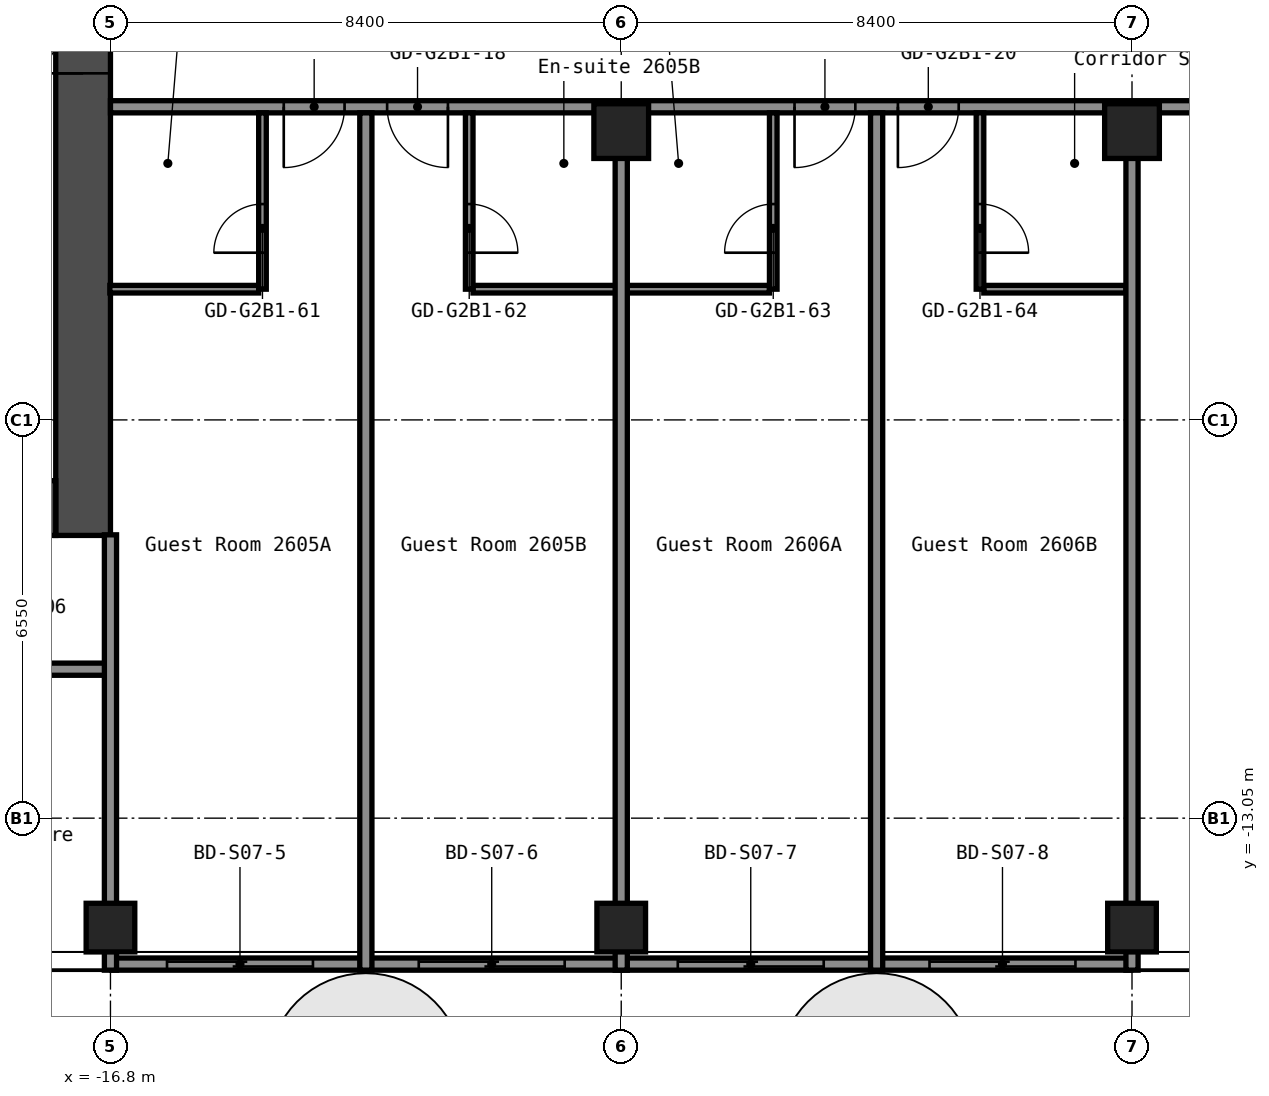
"""IFC4 building model, lengths in metres.
Left out: names, types, materials, properties, quantities, classifications, styles, units other than length and angle.
Written with IfcOpenShell. Run it as: python <this file> out.ifc"""

import sys

from ifc_helpers import new_model, si_unit, direction, frame, frame_2d, origin, origin_2d, place, context, subcontext, project, spatial, rectangle, hollow_rectangle, extrude, element, fill, save


model = new_model("IFC4")
c1 = context("Model", 3, precision=1e-05, world=origin(), true_north=direction((0.0, 1.0)))
c2 = subcontext(c1, "Body", "Model", "MODEL_VIEW")
j1 = project(units=[si_unit("LENGTHUNIT", "METRE"), si_unit("PLANEANGLEUNIT", "RADIAN")], contexts=[c1])
p1 = place(None, origin())
s1 = spatial("IfcSite", under=j1, at=p1, CompositionType="ELEMENT")
p2 = place(p1, origin())
s2 = spatial("IfcBuilding", under=s1, at=p2, CompositionType="ELEMENT")
p3 = place(p2, frame((0.0, 0.0, 94.6)))
s3 = spatial("IfcBuildingStorey", under=s2, at=p3, CompositionType="ELEMENT", Elevation=94.6)
for number, where, z_axis, x_axis in (
    (1, (-16.8, -14.85, 0.0), (0.0, 0.0, 1.0), (1.0, 0.0, 0.0)),
    (2, (-8.4, -14.85, 0.0), (0.0, 0.0, 1.0), (1.0, 0.0, 0.0)),
):
    element("IfcColumn", number, at=place(p3, frame(where, z_axis=z_axis, x_axis=x_axis)), inside=s3, PredefinedType="COLUMN", context=c2, shape_type="SweptSolid", body=[
        extrude(hollow_rectangle(XDim=0.8, YDim=0.8, WallThickness=0.032, at=origin_2d()), origin(), (0.0, 0.0, 1.0), 2.8),
    ])
p4 = place(p3, frame((-8.4, -1.75, 0.0), z_axis=(0.0, 0.0, 1.0), x_axis=(1.0, 0.0, 0.0)))
e3 = element("IfcColumn", 3, at=p4, inside=s3, PredefinedType="COLUMN", context=c2, shape_type="SweptSolid", body=[
    extrude(hollow_rectangle(XDim=0.9, YDim=0.9, WallThickness=0.036, at=origin_2d()), origin(), (0.0, 0.0, 1.0), 2.8),
])
p5 = place(p3, frame((0.0, -14.85, 0.0), z_axis=(0.0, 0.0, 1.0), x_axis=(1.0, 0.0, 0.0)))
e4 = element("IfcColumn", 4, at=p5, inside=s3, PredefinedType="COLUMN", context=c2, shape_type="SweptSolid", body=[
    extrude(hollow_rectangle(XDim=0.8, YDim=0.8, WallThickness=0.032, at=origin_2d()), origin(), (0.0, 0.0, 1.0), 2.8),
])
p6 = place(p3, frame((0.0, -1.75, 0.0), z_axis=(0.0, 0.0, 1.0), x_axis=(1.0, 0.0, 0.0)))
e5 = element("IfcColumn", 5, at=p6, inside=s3, PredefinedType="COLUMN", context=c2, shape_type="SweptSolid", body=[
    extrude(hollow_rectangle(XDim=0.9, YDim=0.9, WallThickness=0.036, at=origin_2d()), origin(), (0.0, 0.0, 1.0), 2.8),
])
p7 = place(p3, frame((-17.25, -8.4, 0.0), z_axis=(0.0, 0.0, 1.0), x_axis=(0.0, 1.0, 0.0)))
e6 = element("IfcWall", 6, at=p7, inside=s3, PredefinedType="SHEAR", context=c2, shape_type="SweptSolid", body=[
    extrude(rectangle(XDim=16.8, YDim=0.9, at=frame_2d((8.4, 0.0))), origin(), (0.0, 0.0, 1.0), 2.8),
])
p8 = place(p7, frame((7.6, 0.0, 0.0)))
e7 = element("IfcOpeningElement", 7, at=p8, cuts=e6, PredefinedType="OPENING", context=c2, shape_type="SweptSolid", body=[
    extrude(rectangle(XDim=1.2, YDim=2.1, at=frame_2d((0.6, 1.05))), frame((0.0, 0.46, 0.0), z_axis=(0.0, -1.0, 0.0), x_axis=(1.0, 0.0, 0.0)), (0.0, 0.0, 1.0), 0.92),
])
p9 = place(p3, frame((-32.7, -7.95, 0.0), z_axis=(0.0, 0.0, 1.0), x_axis=(1.0, 0.0, 0.0)))
e8 = element("IfcWall", 8, at=p9, inside=s3, PredefinedType="SHEAR", context=c2, shape_type="SweptSolid", body=[
    extrude(rectangle(XDim=15.0, YDim=0.9, at=frame_2d((7.5, 0.0))), origin(), (0.0, 0.0, 1.0), 2.8),
])
p10 = place(p9, frame((11.45, 0.0, 0.0)))
e9 = element("IfcOpeningElement", 9, at=p10, cuts=e8, PredefinedType="OPENING", context=c2, shape_type="SweptSolid", body=[
    extrude(rectangle(XDim=1.0, YDim=2.1, at=frame_2d((0.5, 1.05))), frame((0.0, 0.46, 0.0), z_axis=(0.0, -1.0, 0.0), x_axis=(1.0, 0.0, 0.0)), (0.0, 0.0, 1.0), 0.92),
])
p11 = place(p3, frame((-46.5, -10.6, 0.0), z_axis=(0.0, 0.0, 1.0), x_axis=(1.0, 0.0, 0.0)))
e10 = element("IfcWall", 10, at=p11, inside=s3, PredefinedType="PARTITIONING", context=c2, shape_type="SweptSolid", body=[
    extrude(rectangle(XDim=29.7, YDim=0.2, at=frame_2d((14.85, 0.0))), origin(), (0.0, 0.0, 1.0), 2.8),
])
p12 = place(p11, frame((1.95, 0.0, 0.0)))
e11 = element("IfcOpeningElement", 11, at=p12, cuts=e10, PredefinedType="OPENING", context=c2, shape_type="SweptSolid", body=[
    extrude(rectangle(XDim=0.9, YDim=2.1, at=frame_2d((0.45, 1.05))), frame((0.0, 0.11, 0.0), z_axis=(0.0, -1.0, 0.0), x_axis=(1.0, 0.0, 0.0)), (0.0, 0.0, 1.0), 0.22),
])
p13 = place(p11, frame((6.32, 0.0, 0.0)))
e12 = element("IfcOpeningElement", 12, at=p13, cuts=e10, PredefinedType="OPENING", context=c2, shape_type="SweptSolid", body=[
    extrude(rectangle(XDim=0.9, YDim=2.1, at=frame_2d((0.45, 1.05))), frame((0.0, 0.11, 0.0), z_axis=(0.0, -1.0, 0.0), x_axis=(1.0, 0.0, 0.0)), (0.0, 0.0, 1.0), 0.22),
])
p14 = place(p11, frame((10.52, 0.0, 0.0)))
e13 = element("IfcOpeningElement", 13, at=p14, cuts=e10, PredefinedType="OPENING", context=c2, shape_type="SweptSolid", body=[
    extrude(rectangle(XDim=0.9, YDim=2.1, at=frame_2d((0.45, 1.05))), frame((0.0, 0.11, 0.0), z_axis=(0.0, -1.0, 0.0), x_axis=(1.0, 0.0, 0.0)), (0.0, 0.0, 1.0), 0.22),
])
p15 = place(p11, frame((16.6, 0.0, 0.0)))
e14 = element("IfcOpeningElement", 14, at=p15, cuts=e10, PredefinedType="OPENING", context=c2, shape_type="SweptSolid", body=[
    extrude(rectangle(XDim=1.0, YDim=2.1, at=frame_2d((0.5, 1.05))), frame((0.0, 0.11, 0.0), z_axis=(0.0, -1.0, 0.0), x_axis=(1.0, 0.0, 0.0)), (0.0, 0.0, 1.0), 0.22),
])
p16 = place(p11, frame((23.37, 0.0, 0.0)))
e15 = element("IfcOpeningElement", 15, at=p16, cuts=e10, PredefinedType="OPENING", context=c2, shape_type="SweptSolid", body=[
    extrude(rectangle(XDim=0.9, YDim=2.1, at=frame_2d((0.45, 1.05))), frame((0.0, 0.11, 0.0), z_axis=(0.0, -1.0, 0.0), x_axis=(1.0, 0.0, 0.0)), (0.0, 0.0, 1.0), 0.22),
])
p17 = place(p11, frame((27.57, 0.0, 0.0)))
e16 = element("IfcOpeningElement", 16, at=p17, cuts=e10, PredefinedType="OPENING", context=c2, shape_type="SweptSolid", body=[
    extrude(rectangle(XDim=0.9, YDim=2.1, at=frame_2d((0.45, 1.05))), frame((0.0, 0.11, 0.0), z_axis=(0.0, -1.0, 0.0), x_axis=(1.0, 0.0, 0.0)), (0.0, 0.0, 1.0), 0.22),
])
p18 = place(p3, frame((-16.81, -4.35, 0.0), z_axis=(0.0, 0.0, 1.0), x_axis=(1.0, 0.0, 0.0)))
e17 = element("IfcWall", 17, at=p18, inside=s3, PredefinedType="PARTITIONING", context=c2, shape_type="SweptSolid", body=[
    extrude(rectangle(XDim=2.448, YDim=0.125, at=frame_2d((1.224, 0.0))), origin(), (0.0, 0.0, 1.0), 2.8),
])
p19 = place(p3, frame((-10.837, -4.35, 0.0), z_axis=(0.0, 0.0, 1.0), x_axis=(1.0, 0.0, 0.0)))
e18 = element("IfcWall", 18, at=p19, inside=s3, PredefinedType="PARTITIONING", context=c2, shape_type="SweptSolid", body=[
    extrude(rectangle(XDim=4.875, YDim=0.125, at=frame_2d((2.438, 0.0))), origin(), (0.0, 0.0, 1.0), 2.8),
])
p20 = place(p3, frame((-2.438, -4.35, 0.0), z_axis=(0.0, 0.0, 1.0), x_axis=(1.0, 0.0, 0.0)))
e19 = element("IfcWall", 19, at=p20, inside=s3, PredefinedType="PARTITIONING", context=c2, shape_type="SweptSolid", body=[
    extrude(rectangle(XDim=2.337, YDim=0.125, at=frame_2d((1.169, 0.0))), origin(), (0.0, 0.0, 1.0), 2.8),
])
p21 = place(p3, frame((-16.8, -1.35, 0.0), z_axis=(0.0, 0.0, 1.0), x_axis=(1.0, 0.0, 0.0)))
e20 = element("IfcWall", 20, at=p21, inside=s3, PredefinedType="PARTITIONING", context=c2, shape_type="SweptSolid", body=[
    extrude(rectangle(XDim=33.6, YDim=0.2, at=frame_2d((16.8, 0.0))), origin(), (0.0, 0.0, 1.0), 2.8),
])
p22 = place(p21, frame((2.85, 0.0, 0.0)))
e21 = element("IfcOpeningElement", 21, at=p22, cuts=e20, PredefinedType="OPENING", context=c2, shape_type="SweptSolid", body=[
    extrude(rectangle(XDim=1.0, YDim=2.1, at=frame_2d((0.5, 1.05))), frame((0.0, 0.11, 0.0), z_axis=(0.0, -1.0, 0.0), x_axis=(1.0, 0.0, 0.0)), (0.0, 0.0, 1.0), 0.22),
])
p23 = place(p21, frame((4.55, 0.0, 0.0)))
e22 = element("IfcOpeningElement", 22, at=p23, cuts=e20, PredefinedType="OPENING", context=c2, shape_type="SweptSolid", body=[
    extrude(rectangle(XDim=1.0, YDim=2.1, at=frame_2d((0.5, 1.05))), frame((0.0, 0.11, 0.0), z_axis=(0.0, -1.0, 0.0), x_axis=(1.0, 0.0, 0.0)), (0.0, 0.0, 1.0), 0.22),
])
p24 = place(p21, frame((11.25, 0.0, 0.0)))
e23 = element("IfcOpeningElement", 23, at=p24, cuts=e20, PredefinedType="OPENING", context=c2, shape_type="SweptSolid", body=[
    extrude(rectangle(XDim=1.0, YDim=2.1, at=frame_2d((0.5, 1.05))), frame((0.0, 0.11, 0.0), z_axis=(0.0, -1.0, 0.0), x_axis=(1.0, 0.0, 0.0)), (0.0, 0.0, 1.0), 0.22),
])
p25 = place(p21, frame((12.95, 0.0, 0.0)))
e24 = element("IfcOpeningElement", 24, at=p25, cuts=e20, PredefinedType="OPENING", context=c2, shape_type="SweptSolid", body=[
    extrude(rectangle(XDim=1.0, YDim=2.1, at=frame_2d((0.5, 1.05))), frame((0.0, 0.11, 0.0), z_axis=(0.0, -1.0, 0.0), x_axis=(1.0, 0.0, 0.0)), (0.0, 0.0, 1.0), 0.22),
])
p26 = place(p21, frame((18.785, 0.0, 0.0)))
e25 = element("IfcOpeningElement", 25, at=p26, cuts=e20, PredefinedType="OPENING", context=c2, shape_type="SweptSolid", body=[
    extrude(rectangle(XDim=0.9, YDim=2.1, at=frame_2d((0.45, 1.05))), frame((0.0, 0.11, 0.0), z_axis=(0.0, -1.0, 0.0), x_axis=(1.0, 0.0, 0.0)), (0.0, 0.0, 1.0), 0.22),
])
p27 = place(p21, frame((22.985, 0.0, 0.0)))
e26 = element("IfcOpeningElement", 26, at=p27, cuts=e20, PredefinedType="OPENING", context=c2, shape_type="SweptSolid", body=[
    extrude(rectangle(XDim=0.9, YDim=2.1, at=frame_2d((0.45, 1.05))), frame((0.0, 0.11, 0.0), z_axis=(0.0, -1.0, 0.0), x_axis=(1.0, 0.0, 0.0)), (0.0, 0.0, 1.0), 0.22),
])
p28 = place(p21, frame((28.05, 0.0, 0.0)))
e27 = element("IfcOpeningElement", 27, at=p28, cuts=e20, PredefinedType="OPENING", context=c2, shape_type="SweptSolid", body=[
    extrude(rectangle(XDim=1.0, YDim=2.1, at=frame_2d((0.5, 1.05))), frame((0.0, 0.11, 0.0), z_axis=(0.0, -1.0, 0.0), x_axis=(1.0, 0.0, 0.0)), (0.0, 0.0, 1.0), 0.22),
])
p29 = place(p21, frame((29.75, 0.0, 0.0)))
e28 = element("IfcOpeningElement", 28, at=p29, cuts=e20, PredefinedType="OPENING", context=c2, shape_type="SweptSolid", body=[
    extrude(rectangle(XDim=1.0, YDim=2.1, at=frame_2d((0.5, 1.05))), frame((0.0, 0.11, 0.0), z_axis=(0.0, -1.0, 0.0), x_axis=(1.0, 0.0, 0.0)), (0.0, 0.0, 1.0), 0.22),
])
p30 = place(p3, frame((-16.8, -15.55, 0.0), z_axis=(0.0, 0.0, 1.0), x_axis=(0.0, 1.0, 0.0)))
e29 = element("IfcWall", 29, at=p30, inside=s3, PredefinedType="PARTITIONING", context=c2, shape_type="SweptSolid", body=[
    extrude(rectangle(XDim=7.16, YDim=0.2, at=frame_2d((3.58, 0.0))), origin(), (0.0, 0.0, 1.0), 2.8),
])
p31 = place(p3, frame((-14.3, -4.35, 0.0), z_axis=(0.0, 0.0, 1.0), x_axis=(0.0, 1.0, 0.0)))
e30 = element("IfcWall", 30, at=p31, inside=s3, PredefinedType="PARTITIONING", context=c2, shape_type="SweptSolid", body=[
    extrude(rectangle(XDim=2.9, YDim=0.125, at=frame_2d((1.45, 0.0))), origin(), (0.0, 0.0, 1.0), 2.8),
])
p32 = place(p31, frame((0.6, 0.0, 0.0)))
e31 = element("IfcOpeningElement", 31, at=p32, cuts=e30, PredefinedType="OPENING", context=c2, shape_type="SweptSolid", body=[
    extrude(rectangle(XDim=0.8, YDim=2.1, at=frame_2d((0.4, 1.05))), frame((0.0, 0.073, 0.0), z_axis=(0.0, -1.0, 0.0), x_axis=(1.0, 0.0, 0.0)), (0.0, 0.0, 1.0), 0.145),
])
p33 = place(p3, frame((-12.6, -15.55, 0.0), z_axis=(0.0, 0.0, 1.0), x_axis=(0.0, 1.0, 0.0)))
e32 = element("IfcWall", 32, at=p33, inside=s3, PredefinedType="PARTITIONING", context=c2, shape_type="SweptSolid", body=[
    extrude(rectangle(XDim=14.1, YDim=0.2, at=frame_2d((7.05, 0.0))), origin(), (0.0, 0.0, 1.0), 2.8),
])
p34 = place(p3, frame((-10.9, -4.35, 0.0), z_axis=(0.0, 0.0, 1.0), x_axis=(0.0, 1.0, 0.0)))
e33 = element("IfcWall", 33, at=p34, inside=s3, PredefinedType="PARTITIONING", context=c2, shape_type="SweptSolid", body=[
    extrude(rectangle(XDim=2.9, YDim=0.125, at=frame_2d((1.45, 0.0))), origin(), (0.0, 0.0, 1.0), 2.8),
])
p35 = place(p34, frame((0.6, 0.0, 0.0)))
e34 = element("IfcOpeningElement", 34, at=p35, cuts=e33, PredefinedType="OPENING", context=c2, shape_type="SweptSolid", body=[
    extrude(rectangle(XDim=0.8, YDim=2.1, at=frame_2d((0.4, 1.05))), frame((0.0, 0.073, 0.0), z_axis=(0.0, -1.0, 0.0), x_axis=(1.0, 0.0, 0.0)), (0.0, 0.0, 1.0), 0.145),
])
p36 = place(p3, frame((-8.4, -15.55, 0.0), z_axis=(0.0, 0.0, 1.0), x_axis=(0.0, 1.0, 0.0)))
e35 = element("IfcWall", 35, at=p36, inside=s3, PredefinedType="PARTITIONING", context=c2, shape_type="SweptSolid", body=[
    extrude(rectangle(XDim=13.36, YDim=0.2, at=frame_2d((6.68, 0.0))), origin(), (0.0, 0.0, 1.0), 2.8),
])
p37 = place(p3, frame((-5.9, -4.35, 0.0), z_axis=(0.0, 0.0, 1.0), x_axis=(0.0, 1.0, 0.0)))
e36 = element("IfcWall", 36, at=p37, inside=s3, PredefinedType="PARTITIONING", context=c2, shape_type="SweptSolid", body=[
    extrude(rectangle(XDim=2.9, YDim=0.125, at=frame_2d((1.45, 0.0))), origin(), (0.0, 0.0, 1.0), 2.8),
])
p38 = place(p37, frame((0.6, 0.0, 0.0)))
e37 = element("IfcOpeningElement", 37, at=p38, cuts=e36, PredefinedType="OPENING", context=c2, shape_type="SweptSolid", body=[
    extrude(rectangle(XDim=0.8, YDim=2.1, at=frame_2d((0.4, 1.05))), frame((0.0, 0.073, 0.0), z_axis=(0.0, -1.0, 0.0), x_axis=(1.0, 0.0, 0.0)), (0.0, 0.0, 1.0), 0.145),
])
p39 = place(p3, frame((-4.2, -15.55, 0.0), z_axis=(0.0, 0.0, 1.0), x_axis=(0.0, 1.0, 0.0)))
e38 = element("IfcWall", 38, at=p39, inside=s3, PredefinedType="PARTITIONING", context=c2, shape_type="SweptSolid", body=[
    extrude(rectangle(XDim=14.1, YDim=0.2, at=frame_2d((7.05, 0.0))), origin(), (0.0, 0.0, 1.0), 2.8),
])
p40 = place(p3, frame((-2.5, -4.35, 0.0), z_axis=(0.0, 0.0, 1.0), x_axis=(0.0, 1.0, 0.0)))
e39 = element("IfcWall", 39, at=p40, inside=s3, PredefinedType="PARTITIONING", context=c2, shape_type="SweptSolid", body=[
    extrude(rectangle(XDim=2.9, YDim=0.125, at=frame_2d((1.45, 0.0))), origin(), (0.0, 0.0, 1.0), 2.8),
])
p41 = place(p40, frame((0.6, 0.0, 0.0)))
e40 = element("IfcOpeningElement", 40, at=p41, cuts=e39, PredefinedType="OPENING", context=c2, shape_type="SweptSolid", body=[
    extrude(rectangle(XDim=0.8, YDim=2.1, at=frame_2d((0.4, 1.05))), frame((0.0, 0.073, 0.0), z_axis=(0.0, -1.0, 0.0), x_axis=(1.0, 0.0, 0.0)), (0.0, 0.0, 1.0), 0.145),
])
p42 = place(p3, frame((0.0, -15.55, 0.0), z_axis=(0.0, 0.0, 1.0), x_axis=(0.0, 1.0, 0.0)))
e41 = element("IfcWall", 41, at=p42, inside=s3, PredefinedType="PARTITIONING", context=c2, shape_type="SweptSolid", body=[
    extrude(rectangle(XDim=13.36, YDim=0.2, at=frame_2d((6.68, 0.0))), origin(), (0.0, 0.0, 1.0), 2.8),
])
p43 = place(p3, frame((-16.78, -15.45, 0.0), z_axis=(0.0, 0.0, 1.0), x_axis=(1.0, 0.0, 0.0)))
p44 = place(p43, frame((0.91, 0.0, 0.0)))
p45 = place(p44, frame((2.4, 0.0, 0.0), z_axis=(0.0, 0.0, 1.0), x_axis=(-1.0, 0.0, 0.0)))
e42 = element("IfcDoor", 42, at=p45, inside=s3, OperationType="SLIDING_TO_LEFT", PredefinedType="DOOR", context=c2, shape_type="SweptSolid", body=[
    extrude(rectangle(XDim=2.4, YDim=2.2, at=frame_2d((1.2, 1.1))), frame((0.0, 0.025, 0.0), z_axis=(0.0, -1.0, 0.0), x_axis=(1.0, 0.0, 0.0)), (0.0, 0.0, 1.0), 0.05),
])
p46 = place(p3, frame((-12.64, -15.45, 0.0), z_axis=(0.0, 0.0, 1.0), x_axis=(1.0, 0.0, 0.0)))
p47 = place(p46, frame((0.91, 0.0, 0.0)))
p48 = place(p47, frame((2.4, 0.0, 0.0), z_axis=(0.0, 0.0, 1.0), x_axis=(-1.0, 0.0, 0.0)))
e43 = element("IfcDoor", 43, at=p48, inside=s3, OperationType="SLIDING_TO_LEFT", PredefinedType="DOOR", context=c2, shape_type="SweptSolid", body=[
    extrude(rectangle(XDim=2.4, YDim=2.2, at=frame_2d((1.2, 1.1))), frame((0.0, 0.025, 0.0), z_axis=(0.0, -1.0, 0.0), x_axis=(1.0, 0.0, 0.0)), (0.0, 0.0, 1.0), 0.05),
])
p49 = place(p3, frame((-8.38, -15.45, 0.0), z_axis=(0.0, 0.0, 1.0), x_axis=(1.0, 0.0, 0.0)))
p50 = place(p49, frame((0.91, 0.0, 0.0)))
p51 = place(p50, frame((2.4, 0.0, 0.0), z_axis=(0.0, 0.0, 1.0), x_axis=(-1.0, 0.0, 0.0)))
e44 = element("IfcDoor", 44, at=p51, inside=s3, OperationType="SLIDING_TO_LEFT", PredefinedType="DOOR", context=c2, shape_type="SweptSolid", body=[
    extrude(rectangle(XDim=2.4, YDim=2.2, at=frame_2d((1.2, 1.1))), frame((0.0, 0.025, 0.0), z_axis=(0.0, -1.0, 0.0), x_axis=(1.0, 0.0, 0.0)), (0.0, 0.0, 1.0), 0.05),
])
p52 = place(p3, frame((-4.24, -15.45, 0.0), z_axis=(0.0, 0.0, 1.0), x_axis=(1.0, 0.0, 0.0)))
p53 = place(p52, frame((0.91, 0.0, 0.0)))
p54 = place(p53, frame((2.4, 0.0, 0.0), z_axis=(0.0, 0.0, 1.0), x_axis=(-1.0, 0.0, 0.0)))
e45 = element("IfcDoor", 45, at=p54, inside=s3, OperationType="SLIDING_TO_LEFT", PredefinedType="DOOR", context=c2, shape_type="SweptSolid", body=[
    extrude(rectangle(XDim=2.4, YDim=2.2, at=frame_2d((1.2, 1.1))), frame((0.0, 0.025, 0.0), z_axis=(0.0, -1.0, 0.0), x_axis=(1.0, 0.0, 0.0)), (0.0, 0.0, 1.0), 0.05),
])
p55 = place(p8, origin())
e46 = element("IfcDoor", 46, at=p55, inside=s3, OperationType="DOUBLE_DOOR_SINGLE_SWING", PredefinedType="DOOR", context=c2, shape_type="SweptSolid", body=[
    extrude(rectangle(XDim=1.2, YDim=2.1, at=frame_2d((0.6, 1.05))), frame((0.0, 0.025, 0.0), z_axis=(0.0, -1.0, 0.0), x_axis=(1.0, 0.0, 0.0)), (0.0, 0.0, 1.0), 0.05),
])
fill(e7, e46)
p56 = place(p22, origin())
e47 = element("IfcDoor", 47, at=p56, inside=s3, OperationType="SINGLE_SWING_LEFT", PredefinedType="DOOR", context=c2, shape_type="SweptSolid", body=[
    extrude(rectangle(XDim=1.0, YDim=2.1, at=frame_2d((0.5, 1.05))), frame((0.0, 0.025, 0.0), z_axis=(0.0, -1.0, 0.0), x_axis=(1.0, 0.0, 0.0)), (0.0, 0.0, 1.0), 0.05),
])
fill(e21, e47)
p57 = place(p23, origin())
e48 = element("IfcDoor", 48, at=p57, inside=s3, OperationType="SINGLE_SWING_RIGHT", PredefinedType="DOOR", context=c2, shape_type="SweptSolid", body=[
    extrude(rectangle(XDim=1.0, YDim=2.1, at=frame_2d((0.5, 1.05))), frame((0.0, 0.025, 0.0), z_axis=(0.0, -1.0, 0.0), x_axis=(1.0, 0.0, 0.0)), (0.0, 0.0, 1.0), 0.05),
])
fill(e22, e48)
p58 = place(p24, origin())
e49 = element("IfcDoor", 49, at=p58, inside=s3, OperationType="SINGLE_SWING_LEFT", PredefinedType="DOOR", context=c2, shape_type="SweptSolid", body=[
    extrude(rectangle(XDim=1.0, YDim=2.1, at=frame_2d((0.5, 1.05))), frame((0.0, 0.025, 0.0), z_axis=(0.0, -1.0, 0.0), x_axis=(1.0, 0.0, 0.0)), (0.0, 0.0, 1.0), 0.05),
])
fill(e23, e49)
p59 = place(p25, origin())
e50 = element("IfcDoor", 50, at=p59, inside=s3, OperationType="SINGLE_SWING_LEFT", PredefinedType="DOOR", context=c2, shape_type="SweptSolid", body=[
    extrude(rectangle(XDim=1.0, YDim=2.1, at=frame_2d((0.5, 1.05))), frame((0.0, 0.025, 0.0), z_axis=(0.0, -1.0, 0.0), x_axis=(1.0, 0.0, 0.0)), (0.0, 0.0, 1.0), 0.05),
])
fill(e24, e50)
p60 = place(p32, origin())
e51 = element("IfcDoor", 51, at=p60, inside=s3, OperationType="SINGLE_SWING_RIGHT", PredefinedType="DOOR", context=c2, shape_type="SweptSolid", body=[
    extrude(rectangle(XDim=0.8, YDim=2.1, at=frame_2d((0.4, 1.05))), frame((0.0, 0.025, 0.0), z_axis=(0.0, -1.0, 0.0), x_axis=(1.0, 0.0, 0.0)), (0.0, 0.0, 1.0), 0.05),
])
fill(e31, e51)
p61 = place(p35, origin())
e52 = element("IfcDoor", 52, at=p61, inside=s3, OperationType="SINGLE_SWING_LEFT", PredefinedType="DOOR", context=c2, shape_type="SweptSolid", body=[
    extrude(rectangle(XDim=0.8, YDim=2.1, at=frame_2d((0.4, 1.05))), frame((0.0, 0.025, 0.0), z_axis=(0.0, -1.0, 0.0), x_axis=(1.0, 0.0, 0.0)), (0.0, 0.0, 1.0), 0.05),
])
fill(e34, e52)
p62 = place(p38, origin())
e53 = element("IfcDoor", 53, at=p62, inside=s3, OperationType="SINGLE_SWING_RIGHT", PredefinedType="DOOR", context=c2, shape_type="SweptSolid", body=[
    extrude(rectangle(XDim=0.8, YDim=2.1, at=frame_2d((0.4, 1.05))), frame((0.0, 0.025, 0.0), z_axis=(0.0, -1.0, 0.0), x_axis=(1.0, 0.0, 0.0)), (0.0, 0.0, 1.0), 0.05),
])
fill(e37, e53)
p63 = place(p41, origin())
e54 = element("IfcDoor", 54, at=p63, inside=s3, OperationType="SINGLE_SWING_LEFT", PredefinedType="DOOR", context=c2, shape_type="SweptSolid", body=[
    extrude(rectangle(XDim=0.8, YDim=2.1, at=frame_2d((0.4, 1.05))), frame((0.0, 0.025, 0.0), z_axis=(0.0, -1.0, 0.0), x_axis=(1.0, 0.0, 0.0)), (0.0, 0.0, 1.0), 0.05),
])
fill(e40, e54)
save(model, sys.argv[1])
